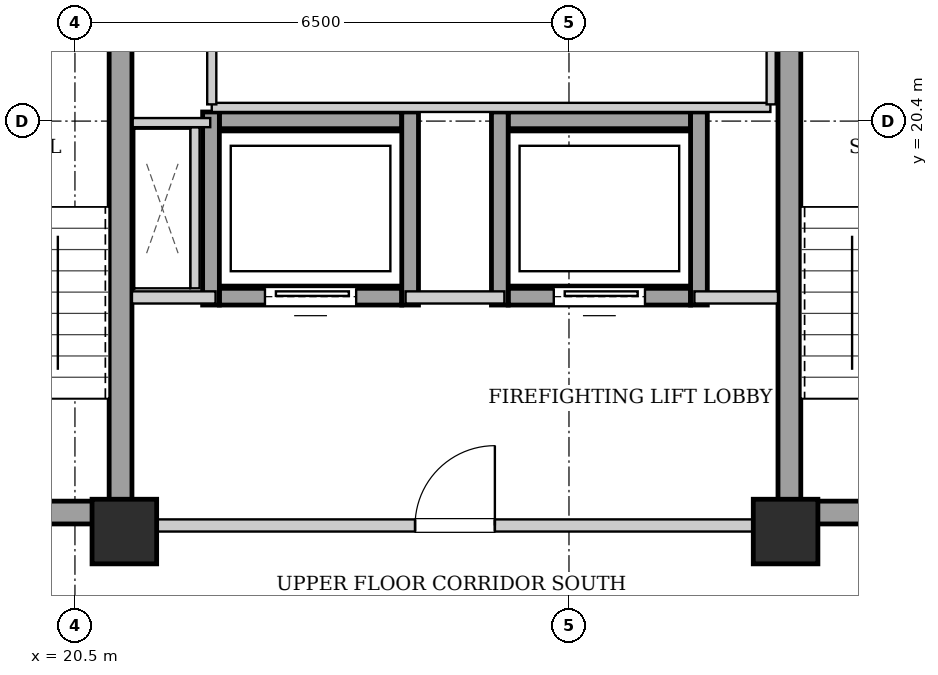
"""IFC4 building model, lengths in metres.
Left out: names, types, materials, properties, quantities, classifications, styles, units other than length and angle.
Written with IfcOpenShell. Run it as: python <this file> out.ifc"""

import sys

from ifc_helpers import new_model, si_unit, direction, frame, frame_2d, origin, origin_2d, place, context, subcontext, project, spatial, rectangle, extrude, element, fill, save


model = new_model("IFC4")
c1 = context("Model", 3, precision=1e-05, world=origin(), true_north=direction((0.0, 1.0)))
c2 = subcontext(c1, "Body", "Model", "MODEL_VIEW")
j1 = project(units=[si_unit("LENGTHUNIT", "METRE"), si_unit("PLANEANGLEUNIT", "RADIAN")], contexts=[c1])
p1 = place(None, origin())
s1 = spatial("IfcSite", under=j1, at=p1, CompositionType="ELEMENT")
p2 = place(p1, origin())
s2 = spatial("IfcBuilding", under=s1, at=p2, CompositionType="ELEMENT")
p3 = place(p2, frame((0.0, 0.0, 184.3)))
s3 = spatial("IfcBuildingStorey", under=s2, at=p3, CompositionType="ELEMENT", Elevation=184.3)
for number, where, z_axis, x_axis in (
    (1, (21.15, 15.0, 0.0), (0.0, 0.0, 1.0), (1.0, 0.0, 0.0)),
    (2, (29.85, 15.0, 0.0), (0.0, 0.0, 1.0), (1.0, 0.0, 0.0)),
):
    element("IfcColumn", number, at=place(p3, frame(where, z_axis=z_axis, x_axis=x_axis)), inside=s3, PredefinedType="COLUMN", context=c2, shape_type="SweptSolid", body=[
        extrude(rectangle(XDim=0.85, YDim=0.85, at=origin_2d()), origin(), (0.0, 0.0, 1.0), 3.3),
    ])
p4 = place(p3, frame((21.1, 15.1, 0.0), z_axis=(0.0, 0.0, 1.0), x_axis=(0.0, 1.0, 0.0)))
e3 = element("IfcWall", 3, at=p4, inside=s3, PredefinedType="SHEAR", context=c2, shape_type="SweptSolid", body=[
    extrude(rectangle(XDim=9.0, YDim=0.3, at=frame_2d((4.5, 0.0))), origin(), (0.0, 0.0, 1.0), 3.04),
])
p5 = place(p3, frame((18.1, 15.25, 0.0), z_axis=(0.0, 0.0, 1.0), x_axis=(1.0, 0.0, 0.0)))
e4 = element("IfcWall", 4, at=p5, inside=s3, PredefinedType="SHEAR", context=c2, shape_type="SweptSolid", body=[
    extrude(rectangle(XDim=2.85, YDim=0.3, at=frame_2d((1.425, 0.0))), origin(), (0.0, 0.0, 1.0), 3.04),
])
p6 = place(p5, frame((0.86, 0.0, 0.0)))
e5 = element("IfcOpeningElement", 5, at=p6, cuts=e4, PredefinedType="OPENING", context=c2, shape_type="SweptSolid", body=[
    extrude(rectangle(XDim=1.1, YDim=2.05, at=frame_2d((0.55, 1.025))), frame((0.0, 0.16, 0.0), z_axis=(0.0, -1.0, 0.0), x_axis=(1.0, 0.0, 0.0)), (0.0, 0.0, 1.0), 0.32),
])
p7 = place(p3, frame((29.9, 15.1, 0.0), z_axis=(0.0, 0.0, 1.0), x_axis=(0.0, 1.0, 0.0)))
e6 = element("IfcWall", 6, at=p7, inside=s3, PredefinedType="SHEAR", context=c2, shape_type="SweptSolid", body=[
    extrude(rectangle(XDim=9.0, YDim=0.3, at=frame_2d((4.5, 0.0))), origin(), (0.0, 0.0, 1.0), 3.04),
])
p8 = place(p3, frame((30.05, 15.25, 0.0), z_axis=(0.0, 0.0, 1.0), x_axis=(1.0, 0.0, 0.0)))
e7 = element("IfcWall", 7, at=p8, inside=s3, PredefinedType="SHEAR", context=c2, shape_type="SweptSolid", body=[
    extrude(rectangle(XDim=2.85, YDim=0.3, at=frame_2d((1.425, 0.0))), origin(), (0.0, 0.0, 1.0), 3.04),
])
p9 = place(p8, frame((0.86, 0.0, 0.0)))
e8 = element("IfcOpeningElement", 8, at=p9, cuts=e7, PredefinedType="OPENING", context=c2, shape_type="SweptSolid", body=[
    extrude(rectangle(XDim=1.1, YDim=2.05, at=frame_2d((0.55, 1.025))), frame((0.0, 0.16, 0.0), z_axis=(0.0, -1.0, 0.0), x_axis=(1.0, 0.0, 0.0)), (0.0, 0.0, 1.0), 0.32),
])
p10 = place(p3, frame((22.4, 18.09, 0.0), z_axis=(0.0, 0.0, 1.0), x_axis=(1.0, 0.0, 0.0)))
e9 = element("IfcWall", 9, at=p10, inside=s3, PredefinedType="SHEAR", context=c2, shape_type="SweptSolid", body=[
    extrude(rectangle(XDim=2.4, YDim=0.22, at=frame_2d((1.2, 0.0))), origin(), (0.0, 0.0, 1.0), 3.04),
])
p11 = place(p10, frame((0.6, 0.0, 0.0)))
e10 = element("IfcOpeningElement", 10, at=p11, cuts=e9, PredefinedType="OPENING", context=c2, shape_type="SweptSolid", body=[
    extrude(rectangle(XDim=1.2, YDim=2.15, at=frame_2d((0.6, 1.075))), frame((0.0, 0.12, 0.0), z_axis=(0.0, -1.0, 0.0), x_axis=(1.0, 0.0, 0.0)), (0.0, 0.0, 1.0), 0.24),
])
p12 = place(p3, frame((22.4, 20.41, 0.0), z_axis=(0.0, 0.0, 1.0), x_axis=(1.0, 0.0, 0.0)))
e11 = element("IfcWall", 11, at=p12, inside=s3, PredefinedType="SHEAR", context=c2, shape_type="SweptSolid", body=[
    extrude(rectangle(XDim=2.4, YDim=0.22, at=frame_2d((1.2, 0.0))), origin(), (0.0, 0.0, 1.0), 3.04),
])
for number, where, z_axis, x_axis in (
    (12, (22.29, 17.98, 0.0), (0.0, 0.0, 1.0), (0.0, 1.0, 0.0)),
    (13, (24.91, 17.98, 0.0), (0.0, 0.0, 1.0), (0.0, 1.0, 0.0)),
):
    element("IfcWall", number, at=place(p3, frame(where, z_axis=z_axis, x_axis=x_axis)), inside=s3, PredefinedType="SHEAR", context=c2, shape_type="SweptSolid", body=[
        extrude(rectangle(XDim=2.54, YDim=0.22, at=frame_2d((1.27, 0.0))), origin(), (0.0, 0.0, 1.0), 3.04),
    ])
p13 = place(p3, frame((26.2, 18.09, 0.0), z_axis=(0.0, 0.0, 1.0), x_axis=(1.0, 0.0, 0.0)))
e14 = element("IfcWall", 14, at=p13, inside=s3, PredefinedType="SHEAR", context=c2, shape_type="SweptSolid", body=[
    extrude(rectangle(XDim=2.4, YDim=0.22, at=frame_2d((1.2, 0.0))), origin(), (0.0, 0.0, 1.0), 3.04),
])
p14 = place(p13, frame((0.6, 0.0, 0.0)))
e15 = element("IfcOpeningElement", 15, at=p14, cuts=e14, PredefinedType="OPENING", context=c2, shape_type="SweptSolid", body=[
    extrude(rectangle(XDim=1.2, YDim=2.15, at=frame_2d((0.6, 1.075))), frame((0.0, 0.12, 0.0), z_axis=(0.0, -1.0, 0.0), x_axis=(1.0, 0.0, 0.0)), (0.0, 0.0, 1.0), 0.24),
])
p15 = place(p3, frame((26.2, 20.41, 0.0), z_axis=(0.0, 0.0, 1.0), x_axis=(1.0, 0.0, 0.0)))
e16 = element("IfcWall", 16, at=p15, inside=s3, PredefinedType="SHEAR", context=c2, shape_type="SweptSolid", body=[
    extrude(rectangle(XDim=2.4, YDim=0.22, at=frame_2d((1.2, 0.0))), origin(), (0.0, 0.0, 1.0), 3.04),
])
for number, where, z_axis, x_axis in (
    (17, (26.09, 17.98, 0.0), (0.0, 0.0, 1.0), (0.0, 1.0, 0.0)),
    (18, (28.71, 17.98, 0.0), (0.0, 0.0, 1.0), (0.0, 1.0, 0.0)),
):
    element("IfcWall", number, at=place(p3, frame(where, z_axis=z_axis, x_axis=x_axis)), inside=s3, PredefinedType="SHEAR", context=c2, shape_type="SweptSolid", body=[
        extrude(rectangle(XDim=2.54, YDim=0.22, at=frame_2d((1.27, 0.0))), origin(), (0.0, 0.0, 1.0), 3.04),
    ])
p16 = place(p3, frame((21.25, 15.08, 0.0), z_axis=(0.0, 0.0, 1.0), x_axis=(1.0, 0.0, 0.0)))
e19 = element("IfcWall", 19, at=p16, inside=s3, PredefinedType="PARTITIONING", context=c2, shape_type="SweptSolid", body=[
    extrude(rectangle(XDim=8.5, YDim=0.16, at=frame_2d((4.25, 0.0))), origin(), (0.0, 0.0, 1.0), 2.556),
])
p17 = place(p16, frame((3.725, 0.0, 0.0)))
e20 = element("IfcOpeningElement", 20, at=p17, cuts=e19, PredefinedType="OPENING", context=c2, shape_type="SweptSolid", body=[
    extrude(rectangle(XDim=1.05, YDim=2.05, at=frame_2d((0.525, 1.025))), frame((0.0, 0.09, 0.0), z_axis=(0.0, -1.0, 0.0), x_axis=(1.0, 0.0, 0.0)), (0.0, 0.0, 1.0), 0.18),
])
p18 = place(p3, frame((21.25, 18.08, 0.0), z_axis=(0.0, 0.0, 1.0), x_axis=(1.0, 0.0, 0.0)))
e21 = element("IfcWall", 21, at=p18, inside=s3, PredefinedType="PARTITIONING", context=c2, shape_type="SweptSolid", body=[
    extrude(rectangle(XDim=1.1, YDim=0.16, at=frame_2d((0.55, 0.0))), origin(), (0.0, 0.0, 1.0), 3.04),
])
p19 = place(p3, frame((24.85, 18.08, 0.0), z_axis=(0.0, 0.0, 1.0), x_axis=(1.0, 0.0, 0.0)))
e22 = element("IfcWall", 22, at=p19, inside=s3, PredefinedType="PARTITIONING", context=c2, shape_type="SweptSolid", body=[
    extrude(rectangle(XDim=1.3, YDim=0.16, at=frame_2d((0.65, 0.0))), origin(), (0.0, 0.0, 1.0), 3.04),
])
p20 = place(p3, frame((28.65, 18.08, 0.0), z_axis=(0.0, 0.0, 1.0), x_axis=(1.0, 0.0, 0.0)))
e23 = element("IfcWall", 23, at=p20, inside=s3, PredefinedType="PARTITIONING", context=c2, shape_type="SweptSolid", body=[
    extrude(rectangle(XDim=1.1, YDim=0.16, at=frame_2d((0.55, 0.0))), origin(), (0.0, 0.0, 1.0), 3.04),
])
p21 = place(p3, frame((22.08, 18.2, 0.0), z_axis=(0.0, 0.0, 1.0), x_axis=(0.0, 1.0, 0.0)))
e24 = element("IfcWall", 24, at=p21, inside=s3, PredefinedType="PARTITIONING", context=c2, shape_type="SweptSolid", body=[
    extrude(rectangle(XDim=2.12, YDim=0.12, at=frame_2d((1.06, 0.0))), origin(), (0.0, 0.0, 1.0), 3.04),
])
p22 = place(p3, frame((22.28, 20.38, 0.0), z_axis=(0.0, 0.0, 1.0), x_axis=(-1.0, 0.0, 0.0)))
e25 = element("IfcWall", 25, at=p22, inside=s3, PredefinedType="PARTITIONING", context=c2, shape_type="SweptSolid", body=[
    extrude(rectangle(XDim=1.02, YDim=0.12, at=frame_2d((0.51, 0.0))), origin(), (0.0, 0.0, 1.0), 3.04),
])
p23 = place(p3, frame((22.3, 20.58, 0.0), z_axis=(0.0, 0.0, 1.0), x_axis=(1.0, 0.0, 0.0)))
e26 = element("IfcWall", 26, at=p23, inside=s3, PredefinedType="PARTITIONING", context=c2, shape_type="SweptSolid", body=[
    extrude(rectangle(XDim=7.35, YDim=0.12, at=frame_2d((3.675, 0.0))), origin(), (0.0, 0.0, 1.0), 3.04),
])
for number, where, z_axis, x_axis in (
    (27, (22.3, 20.62, 0.0), (0.0, 0.0, 1.0), (0.0, 1.0, 0.0)),
    (28, (29.66, 20.62, 0.0), (0.0, 0.0, 1.0), (0.0, 1.0, 0.0)),
):
    element("IfcWall", number, at=place(p3, frame(where, z_axis=z_axis, x_axis=x_axis)), inside=s3, PredefinedType="PARTITIONING", context=c2, shape_type="SweptSolid", body=[
        extrude(rectangle(XDim=2.06, YDim=0.12, at=frame_2d((1.03, 0.0))), origin(), (0.0, 0.0, 1.0), 3.04),
    ])
p24 = place(p11, origin())
e29 = element("IfcDoor", 29, at=p24, inside=s3, OperationType="SLIDING_TO_LEFT", PredefinedType="DOOR", context=c2, shape_type="SweptSolid", body=[
    extrude(rectangle(XDim=1.2, YDim=2.15, at=frame_2d((0.6, 1.075))), frame((0.0, 0.025, 0.0), z_axis=(0.0, -1.0, 0.0), x_axis=(1.0, 0.0, 0.0)), (0.0, 0.0, 1.0), 0.05),
])
fill(e10, e29)
p25 = place(p14, origin())
e30 = element("IfcDoor", 30, at=p25, inside=s3, OperationType="SLIDING_TO_LEFT", PredefinedType="DOOR", context=c2, shape_type="SweptSolid", body=[
    extrude(rectangle(XDim=1.2, YDim=2.15, at=frame_2d((0.6, 1.075))), frame((0.0, 0.025, 0.0), z_axis=(0.0, -1.0, 0.0), x_axis=(1.0, 0.0, 0.0)), (0.0, 0.0, 1.0), 0.05),
])
fill(e15, e30)
p26 = place(p17, origin())
e31 = element("IfcDoor", 31, at=p26, inside=s3, OperationType="SINGLE_SWING_RIGHT", PredefinedType="DOOR", context=c2, shape_type="SweptSolid", body=[
    extrude(rectangle(XDim=1.05, YDim=2.05, at=frame_2d((0.525, 1.025))), frame((0.0, 0.025, 0.0), z_axis=(0.0, -1.0, 0.0), x_axis=(1.0, 0.0, 0.0)), (0.0, 0.0, 1.0), 0.05),
])
fill(e20, e31)
save(model, sys.argv[1])
